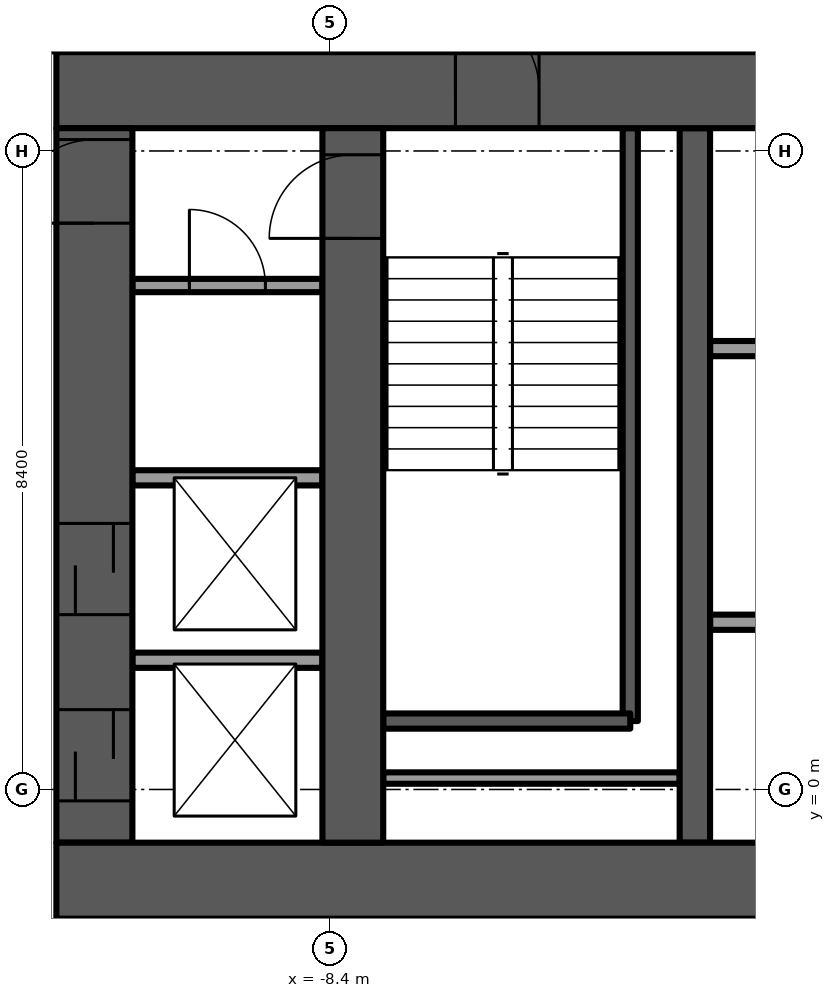
"""IFC4 building model, lengths in metres.
Left out: names, types, materials, properties, quantities, classifications, styles, units other than length and angle.
Written with IfcOpenShell. Run it as: python <this file> out.ifc"""

import sys

from ifc_helpers import new_model, si_unit, direction, frame, frame_2d, origin, place, context, subcontext, project, spatial, rectangle, extrude, element, fill, save


model = new_model("IFC4")
c1 = context("Model", 3, precision=1e-05, world=origin(), true_north=direction((0.0, 1.0)))
c2 = subcontext(c1, "Body", "Model", "MODEL_VIEW")
j1 = project(units=[si_unit("LENGTHUNIT", "METRE"), si_unit("PLANEANGLEUNIT", "RADIAN")], contexts=[c1])
p1 = place(None, origin())
s1 = spatial("IfcSite", under=j1, at=p1, CompositionType="ELEMENT")
p2 = place(p1, origin())
s2 = spatial("IfcBuilding", under=s1, at=p2, CompositionType="ELEMENT")
p3 = place(p2, frame((0.0, 0.0, 116.0)))
s3 = spatial("IfcBuildingStorey", under=s2, at=p3, CompositionType="ELEMENT", Elevation=116.0)
p4 = place(p3, frame((-12.0, -1.2, -0.3), z_axis=(0.0, 0.0, 1.0), x_axis=(1.0, 0.0, 0.0)))
e1 = element("IfcWall", 1, at=p4, inside=s3, PredefinedType="SHEAR", context=c2, shape_type="SweptSolid", body=[
    extrude(rectangle(XDim=24.0, YDim=1.0, at=frame_2d((12.0, 0.0))), origin(), (0.0, 0.0, 1.0), 3.75),
])
p5 = place(p4, frame((11.2, 0.0, 0.0)))
e2 = element("IfcOpeningElement", 2, at=p5, cuts=e1, PredefinedType="OPENING", context=c2, shape_type="SweptSolid", body=[
    extrude(rectangle(XDim=1.6, YDim=2.1, at=frame_2d((0.8, 1.05))), frame((0.0, 0.5, 0.0), z_axis=(0.0, -1.0, 0.0), x_axis=(1.0, 0.0, 0.0)), (0.0, 0.0, 1.0), 1.0),
])
p6 = place(p3, frame((-12.0, 9.2, -0.3), z_axis=(0.0, 0.0, 1.0), x_axis=(1.0, 0.0, 0.0)))
e3 = element("IfcWall", 3, at=p6, inside=s3, PredefinedType="SHEAR", context=c2, shape_type="SweptSolid", body=[
    extrude(rectangle(XDim=24.0, YDim=1.0, at=frame_2d((12.0, 0.0))), origin(), (0.0, 0.0, 1.0), 3.75),
])
p7 = place(p6, frame((11.2, 0.0, 0.0)))
e4 = element("IfcOpeningElement", 4, at=p7, cuts=e3, PredefinedType="OPENING", context=c2, shape_type="SweptSolid", body=[
    extrude(rectangle(XDim=1.6, YDim=2.1, at=frame_2d((0.8, 1.05))), frame((0.0, 0.5, 0.0), z_axis=(0.0, -1.0, 0.0), x_axis=(1.0, 0.0, 0.0)), (0.0, 0.0, 1.0), 1.0),
])
p8 = place(p6, frame((5.25, 0.0, 0.0)))
e5 = element("IfcOpeningElement", 5, at=p8, cuts=e3, PredefinedType="OPENING", context=c2, shape_type="SweptSolid", body=[
    extrude(rectangle(XDim=1.1, YDim=2.1, at=frame_2d((0.55, 1.05))), frame((0.0, 0.5, 0.0), z_axis=(0.0, -1.0, 0.0), x_axis=(1.0, 0.0, 0.0)), (0.0, 0.0, 1.0), 1.0),
])
p9 = place(p6, frame((17.65, 0.0, 0.0)))
e6 = element("IfcOpeningElement", 6, at=p9, cuts=e3, PredefinedType="OPENING", context=c2, shape_type="SweptSolid", body=[
    extrude(rectangle(XDim=1.1, YDim=2.1, at=frame_2d((0.55, 1.05))), frame((0.0, 0.5, 0.0), z_axis=(0.0, -1.0, 0.0), x_axis=(1.0, 0.0, 0.0)), (0.0, 0.0, 1.0), 1.0),
])
p10 = place(p3, frame((-8.1, -0.7, -0.3), z_axis=(0.0, 0.0, 1.0), x_axis=(0.0, 1.0, 0.0)))
e7 = element("IfcWall", 7, at=p10, inside=s3, PredefinedType="SHEAR", context=c2, shape_type="SweptSolid", body=[
    extrude(rectangle(XDim=9.4, YDim=0.8, at=frame_2d((4.7, 0.0))), origin(), (0.0, 0.0, 1.0), 3.75),
])
p11 = place(p10, frame((7.95, 0.0, 0.0)))
e8 = element("IfcOpeningElement", 8, at=p11, cuts=e7, PredefinedType="OPENING", context=c2, shape_type="SweptSolid", body=[
    extrude(rectangle(XDim=1.1, YDim=2.1, at=frame_2d((0.55, 1.05))), frame((0.0, 0.4, 0.0), z_axis=(0.0, -1.0, 0.0), x_axis=(1.0, 0.0, 0.0)), (0.0, 0.0, 1.0), 0.8),
])
p12 = place(p3, frame((-3.6, -0.7, -0.3), z_axis=(0.0, 0.0, 1.0), x_axis=(0.0, 1.0, 0.0)))
e9 = element("IfcWall", 9, at=p12, inside=s3, PredefinedType="SHEAR", context=c2, shape_type="SweptSolid", body=[
    extrude(rectangle(XDim=9.4, YDim=0.4, at=frame_2d((4.7, 0.0))), origin(), (0.0, 0.0, 1.0), 3.75),
])
p13 = place(p3, frame((-11.5, -0.7, -0.3), z_axis=(0.0, 0.0, 1.0), x_axis=(0.0, 1.0, 0.0)))
e10 = element("IfcWall", 10, at=p13, inside=s3, PredefinedType="SHEAR", context=c2, shape_type="SweptSolid", body=[
    extrude(rectangle(XDim=9.4, YDim=1.0, at=frame_2d((4.7, 0.0))), origin(), (0.0, 0.0, 1.0), 3.75),
])
p14 = place(p13, frame((8.15, 0.0, 0.0)))
e11 = element("IfcOpeningElement", 11, at=p14, cuts=e10, PredefinedType="OPENING", context=c2, shape_type="SweptSolid", body=[
    extrude(rectangle(XDim=1.1, YDim=2.1, at=frame_2d((0.55, 1.05))), frame((0.0, 0.5, 0.0), z_axis=(0.0, -1.0, 0.0), x_axis=(1.0, 0.0, 0.0)), (0.0, 0.0, 1.0), 1.0),
])
p15 = place(p13, frame((0.55, 0.0, 0.0)))
e12 = element("IfcOpeningElement", 12, at=p15, cuts=e10, PredefinedType="OPENING", context=c2, shape_type="SweptSolid", body=[
    extrude(rectangle(XDim=1.2, YDim=2.1, at=frame_2d((0.6, 1.05))), frame((0.0, 0.5, 0.0), z_axis=(0.0, -1.0, 0.0), x_axis=(1.0, 0.0, 0.0)), (0.0, 0.0, 1.0), 1.0),
])
p16 = place(p13, frame((3.0, 0.0, 0.0)))
e13 = element("IfcOpeningElement", 13, at=p16, cuts=e10, PredefinedType="OPENING", context=c2, shape_type="SweptSolid", body=[
    extrude(rectangle(XDim=1.2, YDim=2.1, at=frame_2d((0.6, 1.05))), frame((0.0, 0.5, 0.0), z_axis=(0.0, -1.0, 0.0), x_axis=(1.0, 0.0, 0.0)), (0.0, 0.0, 1.0), 1.0),
])
p17 = place(p3, frame((-7.925, 18.792, 0.0), z_axis=(0.0, 0.0, 1.0), x_axis=(-0.499994842654, -0.866028381359, 0.0)))
e14 = element("IfcWall", 14, at=p17, inside=s3, PredefinedType="SOLIDWALL", context=c2, shape_type="SweptSolid", body=[
    extrude(rectangle(XDim=21.853, YDim=0.15, at=frame_2d((10.927, 0.0))), origin(), (0.0, 0.0, 1.0), 3.45),
])
p18 = place(p17, frame((4.293, 0.0, 0.15)))
e15 = element("IfcOpeningElement", 15, at=p18, cuts=e14, PredefinedType="OPENING", context=c2, shape_type="SweptSolid", body=[
    extrude(rectangle(XDim=0.9, YDim=2.85, at=frame_2d((0.45, 1.425))), frame((0.0, 0.075, 0.0), z_axis=(0.0, -1.0, 0.0), x_axis=(1.0, 0.0, 0.0)), (0.0, 0.0, 1.0), 0.15),
])
p19 = place(p17, frame((8.412, 0.0, 0.15)))
e16 = element("IfcOpeningElement", 16, at=p19, cuts=e14, PredefinedType="OPENING", context=c2, shape_type="SweptSolid", body=[
    extrude(rectangle(XDim=0.9, YDim=2.85, at=frame_2d((0.45, 1.425))), frame((0.0, 0.075, 0.0), z_axis=(0.0, -1.0, 0.0), x_axis=(1.0, 0.0, 0.0)), (0.0, 0.0, 1.0), 0.15),
])
p20 = place(p17, frame((12.612, 0.0, 0.15)))
e17 = element("IfcOpeningElement", 17, at=p20, cuts=e14, PredefinedType="OPENING", context=c2, shape_type="SweptSolid", body=[
    extrude(rectangle(XDim=1.7, YDim=2.85, at=frame_2d((0.85, 1.425))), frame((0.0, 0.075, 0.0), z_axis=(0.0, -1.0, 0.0), x_axis=(1.0, 0.0, 0.0)), (0.0, 0.0, 1.0), 0.15),
])
p21 = place(p17, frame((14.712, 0.0, 0.15)))
e18 = element("IfcOpeningElement", 18, at=p21, cuts=e14, PredefinedType="OPENING", context=c2, shape_type="SweptSolid", body=[
    extrude(rectangle(XDim=1.5, YDim=2.85, at=frame_2d((0.75, 1.425))), frame((0.0, 0.075, 0.0), z_axis=(0.0, -1.0, 0.0), x_axis=(1.0, 0.0, 0.0)), (0.0, 0.0, 1.0), 0.15),
])
p22 = place(p17, frame((16.812, 0.0, 0.15)))
e19 = element("IfcOpeningElement", 19, at=p22, cuts=e14, PredefinedType="OPENING", context=c2, shape_type="SweptSolid", body=[
    extrude(rectangle(XDim=1.7, YDim=2.85, at=frame_2d((0.85, 1.425))), frame((0.0, 0.075, 0.0), z_axis=(0.0, -1.0, 0.0), x_axis=(1.0, 0.0, 0.0)), (0.0, 0.0, 1.0), 0.15),
])
p23 = place(p17, frame((18.912, 0.0, 0.15)))
e20 = element("IfcOpeningElement", 20, at=p23, cuts=e14, PredefinedType="OPENING", context=c2, shape_type="SweptSolid", body=[
    extrude(rectangle(XDim=1.5, YDim=2.85, at=frame_2d((0.75, 1.425))), frame((0.0, 0.075, 0.0), z_axis=(0.0, -1.0, 0.0), x_axis=(1.0, 0.0, 0.0)), (0.0, 0.0, 1.0), 0.15),
])
p24 = place(p17, frame((1.022, 0.0, 0.15)))
e21 = element("IfcOpeningElement", 21, at=p24, cuts=e14, PredefinedType="OPENING", context=c2, shape_type="SweptSolid", body=[
    extrude(rectangle(XDim=1.7, YDim=2.73, at=frame_2d((0.85, 1.365))), frame((0.0, 0.075, 0.0), z_axis=(0.0, -1.0, 0.0), x_axis=(1.0, 0.0, 0.0)), (0.0, 0.0, 1.0), 0.15),
])
p25 = place(p3, frame((-18.852, -1.198, 0.0), z_axis=(0.0, 0.0, 1.0), x_axis=(0.499992448691, -0.866029763491, 0.0)))
e22 = element("IfcWall", 22, at=p25, inside=s3, PredefinedType="SOLIDWALL", context=c2, shape_type="SweptSolid", body=[
    extrude(rectangle(XDim=16.777, YDim=0.15, at=frame_2d((8.388, 0.0))), origin(), (0.0, 0.0, 1.0), 3.45),
])
p26 = place(p25, frame((4.015, 0.0, 0.15)))
e23 = element("IfcOpeningElement", 23, at=p26, cuts=e22, PredefinedType="OPENING", context=c2, shape_type="SweptSolid", body=[
    extrude(rectangle(XDim=1.5, YDim=2.85, at=frame_2d((0.75, 1.425))), frame((0.0, 0.075, 0.0), z_axis=(0.0, -1.0, 0.0), x_axis=(1.0, 0.0, 0.0)), (0.0, 0.0, 1.0), 0.15),
])
p27 = place(p25, frame((6.588, 0.0, 0.15)))
e24 = element("IfcOpeningElement", 24, at=p27, cuts=e22, PredefinedType="OPENING", context=c2, shape_type="SweptSolid", body=[
    extrude(rectangle(XDim=1.7, YDim=2.85, at=frame_2d((0.85, 1.425))), frame((0.0, 0.075, 0.0), z_axis=(0.0, -1.0, 0.0), x_axis=(1.0, 0.0, 0.0)), (0.0, 0.0, 1.0), 0.15),
])
p28 = place(p25, frame((8.688, 0.0, 0.0)))
e25 = element("IfcOpeningElement", 25, at=p28, cuts=e22, PredefinedType="OPENING", context=c2, shape_type="SweptSolid", body=[
    extrude(rectangle(XDim=1.5, YDim=2.4, at=frame_2d((0.75, 1.2))), frame((0.0, 0.075, 0.0), z_axis=(0.0, -1.0, 0.0), x_axis=(1.0, 0.0, 0.0)), (0.0, 0.0, 1.0), 0.15),
])
p29 = place(p25, frame((10.788, 0.0, 0.15)))
e26 = element("IfcOpeningElement", 26, at=p29, cuts=e22, PredefinedType="OPENING", context=c2, shape_type="SweptSolid", body=[
    extrude(rectangle(XDim=1.7, YDim=2.85, at=frame_2d((0.85, 1.425))), frame((0.0, 0.075, 0.0), z_axis=(0.0, -1.0, 0.0), x_axis=(1.0, 0.0, 0.0)), (0.0, 0.0, 1.0), 0.15),
])
p30 = place(p25, frame((12.888, 0.0, 0.0)))
e27 = element("IfcOpeningElement", 27, at=p30, cuts=e22, PredefinedType="OPENING", context=c2, shape_type="SweptSolid", body=[
    extrude(rectangle(XDim=1.5, YDim=2.4, at=frame_2d((0.75, 1.2))), frame((0.0, 0.075, 0.0), z_axis=(0.0, -1.0, 0.0), x_axis=(1.0, 0.0, 0.0)), (0.0, 0.0, 1.0), 0.15),
])
p31 = place(p25, frame((0.863, 0.0, 0.15)))
e28 = element("IfcOpeningElement", 28, at=p31, cuts=e22, PredefinedType="OPENING", context=c2, shape_type="SweptSolid", body=[
    extrude(rectangle(XDim=0.9, YDim=2.73, at=frame_2d((0.45, 1.365))), frame((0.0, 0.075, 0.0), z_axis=(0.0, -1.0, 0.0), x_axis=(1.0, 0.0, 0.0)), (0.0, 0.0, 1.0), 0.15),
])
p32 = place(p25, frame((15.333, 0.0, 0.15)))
e29 = element("IfcOpeningElement", 29, at=p32, cuts=e22, PredefinedType="OPENING", context=c2, shape_type="SweptSolid", body=[
    extrude(rectangle(XDim=0.9, YDim=2.73, at=frame_2d((0.45, 1.365))), frame((0.0, 0.075, 0.0), z_axis=(0.0, -1.0, 0.0), x_axis=(1.0, 0.0, 0.0)), (0.0, 0.0, 1.0), 0.15),
])
for number, where, z_axis, x_axis in (
    (30, (-3.4, 2.2, 0.0), (0.0, 0.0, 1.0), (1.0, 0.0, 0.0)),
    (31, (-3.4, 5.8, 0.0), (0.0, 0.0, 1.0), (1.0, 0.0, 0.0)),
):
    element("IfcWall", number, at=place(p3, frame(where, z_axis=z_axis, x_axis=x_axis)), inside=s3, PredefinedType="PARTITIONING", context=c2, shape_type="SweptSolid", body=[
        extrude(rectangle(XDim=2.3, YDim=0.2, at=frame_2d((1.15, 0.0))), origin(), (0.0, 0.0, 1.0), 3.45),
    ])
p33 = place(p3, frame((-4.45, 0.9, -0.3), z_axis=(0.0, 0.0, 1.0), x_axis=(0.0, 1.0, 0.0)))
e32 = element("IfcWall", 32, at=p33, inside=s3, PredefinedType="SOLIDWALL", context=c2, shape_type="SweptSolid", body=[
    extrude(rectangle(XDim=7.8, YDim=0.2, at=frame_2d((3.9, 0.0))), origin(), (0.0, 0.0, 1.0), 3.75),
])
p34 = place(p3, frame((-7.7, 0.9, -0.3), z_axis=(0.0, 0.0, 1.0), x_axis=(1.0, 0.0, 0.0)))
e33 = element("IfcWall", 33, at=p34, inside=s3, PredefinedType="SOLIDWALL", context=c2, shape_type="SweptSolid", body=[
    extrude(rectangle(XDim=3.25, YDim=0.2, at=frame_2d((1.625, 0.0))), origin(), (0.0, 0.0, 1.0), 3.75),
])
p35 = place(p3, frame((-7.7, 0.15, 0.0), z_axis=(0.0, 0.0, 1.0), x_axis=(1.0, 0.0, 0.0)))
e34 = element("IfcWall", 34, at=p35, inside=s3, PredefinedType="PARTITIONING", context=c2, shape_type="SweptSolid", body=[
    extrude(rectangle(XDim=3.9, YDim=0.15, at=frame_2d((1.95, 0.0))), origin(), (0.0, 0.0, 1.0), 3.45),
])
for number, where, z_axis, x_axis in (
    (35, (-11.0, 1.7, 0.0), (0.0, 0.0, 1.0), (1.0, 0.0, 0.0)),
    (36, (-11.0, 4.1, 0.0), (0.0, 0.0, 1.0), (1.0, 0.0, 0.0)),
):
    element("IfcWall", number, at=place(p3, frame(where, z_axis=z_axis, x_axis=x_axis)), inside=s3, PredefinedType="PARTITIONING", context=c2, shape_type="SweptSolid", body=[
        extrude(rectangle(XDim=2.5, YDim=0.2, at=frame_2d((1.25, 0.0))), origin(), (0.0, 0.0, 1.0), 3.45),
    ])
p36 = place(p3, frame((-11.0, 6.63, 0.0), z_axis=(0.0, 0.0, 1.0), x_axis=(1.0, 0.0, 0.0)))
e37 = element("IfcWall", 37, at=p36, inside=s3, PredefinedType="PARTITIONING", context=c2, shape_type="SweptSolid", body=[
    extrude(rectangle(XDim=2.5, YDim=0.175, at=frame_2d((1.25, 0.0))), origin(), (0.0, 0.0, 1.0), 3.45),
])
p37 = place(p36, frame((0.75, 0.0, 0.0)))
e38 = element("IfcOpeningElement", 38, at=p37, cuts=e37, PredefinedType="OPENING", context=c2, shape_type="SweptSolid", body=[
    extrude(rectangle(XDim=1.0, YDim=2.1, at=frame_2d((0.5, 1.05))), frame((0.0, 0.087, 0.0), z_axis=(0.0, -1.0, 0.0), x_axis=(1.0, 0.0, 0.0)), (0.0, 0.0, 1.0), 0.175),
])
p38 = place(p8, origin())
e39 = element("IfcDoor", 39, at=p38, inside=s3, OperationType="SINGLE_SWING_LEFT", PredefinedType="DOOR", context=c2, shape_type="SweptSolid", body=[
    extrude(rectangle(XDim=1.1, YDim=2.1, at=frame_2d((0.55, 1.05))), frame((0.0, 0.025, 0.0), z_axis=(0.0, -1.0, 0.0), x_axis=(1.0, 0.0, 0.0)), (0.0, 0.0, 1.0), 0.05),
])
fill(e5, e39)
p39 = place(p11, origin())
e40 = element("IfcDoor", 40, at=p39, inside=s3, OperationType="SINGLE_SWING_RIGHT", PredefinedType="DOOR", context=c2, shape_type="SweptSolid", body=[
    extrude(rectangle(XDim=1.1, YDim=2.1, at=frame_2d((0.55, 1.05))), frame((0.0, 0.025, 0.0), z_axis=(0.0, -1.0, 0.0), x_axis=(1.0, 0.0, 0.0)), (0.0, 0.0, 1.0), 0.05),
])
fill(e8, e40)
p40 = place(p37, origin())
e41 = element("IfcDoor", 41, at=p40, inside=s3, OperationType="SINGLE_SWING_LEFT", PredefinedType="DOOR", context=c2, shape_type="SweptSolid", body=[
    extrude(rectangle(XDim=1.0, YDim=2.1, at=frame_2d((0.5, 1.05))), frame((0.0, 0.025, 0.0), z_axis=(0.0, -1.0, 0.0), x_axis=(1.0, 0.0, 0.0)), (0.0, 0.0, 1.0), 0.05),
])
fill(e38, e41)
p41 = place(p14, origin())
e42 = element("IfcDoor", 42, at=p41, inside=s3, OperationType="SINGLE_SWING_LEFT", PredefinedType="DOOR", context=c2, shape_type="SweptSolid", body=[
    extrude(rectangle(XDim=1.1, YDim=2.1, at=frame_2d((0.55, 1.05))), frame((0.0, 0.025, 0.0), z_axis=(0.0, -1.0, 0.0), x_axis=(1.0, 0.0, 0.0)), (0.0, 0.0, 1.0), 0.05),
])
fill(e11, e42)
p42 = place(p15, origin())
e43 = element("IfcDoor", 43, at=p42, inside=s3, OperationType="SLIDING_TO_LEFT", PredefinedType="DOOR", context=c2, shape_type="SweptSolid", body=[
    extrude(rectangle(XDim=1.2, YDim=2.1, at=frame_2d((0.6, 1.05))), frame((0.0, 0.025, 0.0), z_axis=(0.0, -1.0, 0.0), x_axis=(1.0, 0.0, 0.0)), (0.0, 0.0, 1.0), 0.05),
])
fill(e12, e43)
p43 = place(p16, origin())
e44 = element("IfcDoor", 44, at=p43, inside=s3, OperationType="SLIDING_TO_LEFT", PredefinedType="DOOR", context=c2, shape_type="SweptSolid", body=[
    extrude(rectangle(XDim=1.2, YDim=2.1, at=frame_2d((0.6, 1.05))), frame((0.0, 0.025, 0.0), z_axis=(0.0, -1.0, 0.0), x_axis=(1.0, 0.0, 0.0)), (0.0, 0.0, 1.0), 0.05),
])
fill(e13, e44)
save(model, sys.argv[1])
